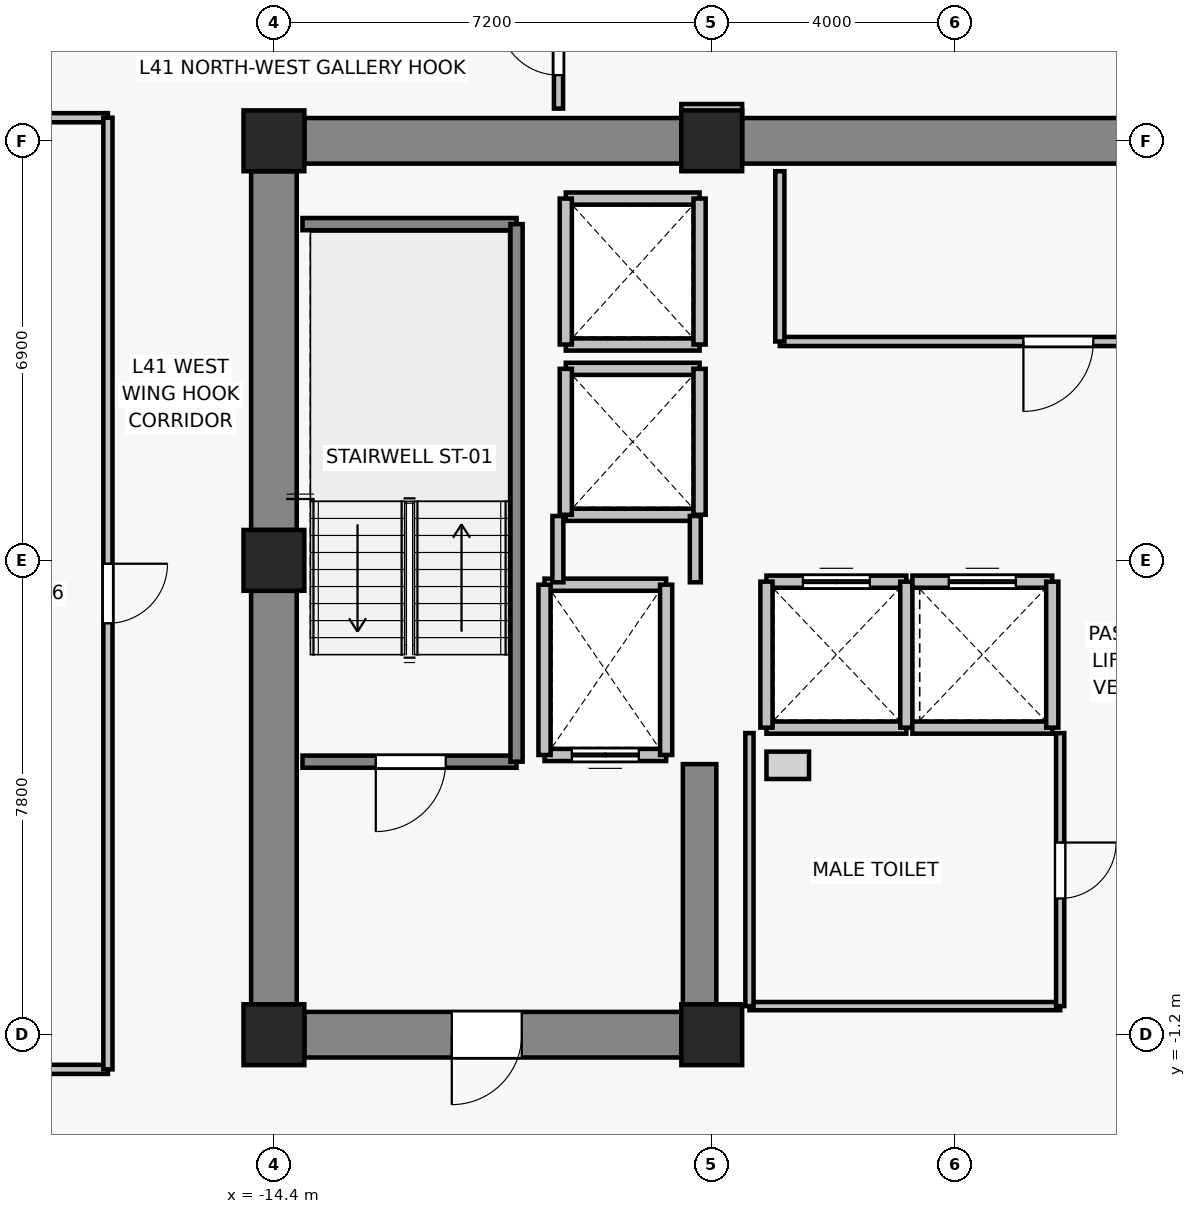
"""IFC4 building model, lengths in metres.
Left out: names, types, materials, properties, quantities, classifications, styles, units other than length and angle.
Written with IfcOpenShell. Run it as: python <this file> out.ifc"""

import sys

from ifc_helpers import new_model, si_unit, direction, frame, frame_2d, origin, origin_2d, place, context, subcontext, project, spatial, rectangle, extrude, source, transform, mapped, element, fill, save


model = new_model("IFC4")
c1 = context("Model", 3, precision=1e-05, world=origin(), true_north=direction((0.0, 1.0)))
c2 = subcontext(c1, "Body", "Model", "MODEL_VIEW")
j1 = project(units=[si_unit("LENGTHUNIT", "METRE"), si_unit("PLANEANGLEUNIT", "RADIAN")], contexts=[c1])
p1 = place(None, origin())
s1 = spatial("IfcSite", under=j1, at=p1, CompositionType="ELEMENT")
p2 = place(p1, origin())
s2 = spatial("IfcBuilding", under=s1, at=p2, CompositionType="ELEMENT")
p3 = place(p2, frame((0.0, 0.0, 149.5)))
s3 = spatial("IfcBuildingStorey", under=s2, at=p3, CompositionType="ELEMENT", Elevation=149.5)
for number, where, z_axis, x_axis in (
    (1, (-14.4, -1.2, 0.0), (0.0, 0.0, 1.0), (1.0, 0.0, 0.0)),
    (2, (-7.2, -1.2, 0.0), (0.0, 0.0, 1.0), (1.0, 0.0, 0.0)),
    (3, (-14.4, 6.6, 0.0), (0.0, 0.0, 1.0), (1.0, 0.0, 0.0)),
    (4, (-14.4, 13.5, 0.0), (0.0, 0.0, 1.0), (1.0, 0.0, 0.0)),
    (5, (-7.2, 13.5, 0.0), (0.0, 0.0, 1.0), (1.0, 0.0, 0.0)),
):
    element("IfcColumn", number, at=place(p3, frame(where, z_axis=z_axis, x_axis=x_axis)), inside=s3, PredefinedType="COLUMN", context=c2, shape_type="SweptSolid", body=[
        extrude(rectangle(XDim=1.0, YDim=1.0, at=origin_2d()), origin(), (0.0, 0.0, 1.0), 3.3),
    ])
p4 = place(p3, frame((-13.9, 13.5, 0.0), z_axis=(0.0, 0.0, 1.0), x_axis=(1.0, 0.0, 0.0)))
e6 = element("IfcWall", 6, at=p4, inside=s3, PredefinedType="SHEAR", context=c2, shape_type="SweptSolid", body=[
    extrude(rectangle(XDim=6.2, YDim=0.75, at=frame_2d((3.1, 0.0))), origin(), (0.0, 0.0, 1.0), 3.075),
])
p5 = place(p3, frame((-6.7, 13.5, 0.0), z_axis=(0.0, 0.0, 1.0), x_axis=(1.0, 0.0, 0.0)))
e7 = element("IfcWall", 7, at=p5, inside=s3, PredefinedType="SHEAR", context=c2, shape_type="SweptSolid", body=[
    extrude(rectangle(XDim=13.4, YDim=0.75, at=frame_2d((6.7, 0.0))), origin(), (0.0, 0.0, 1.0), 3.075),
])
p6 = place(p3, frame((-14.4, -0.7, 0.0), z_axis=(0.0, 0.0, 1.0), x_axis=(0.0, 1.0, 0.0)))
e8 = element("IfcWall", 8, at=p6, inside=s3, PredefinedType="SHEAR", context=c2, shape_type="SweptSolid", body=[
    extrude(rectangle(XDim=6.8, YDim=0.75, at=frame_2d((3.4, 0.0))), origin(), (0.0, 0.0, 1.0), 3.075),
])
p7 = place(p3, frame((-14.4, 7.1, 0.0), z_axis=(0.0, 0.0, 1.0), x_axis=(0.0, 1.0, 0.0)))
e9 = element("IfcWall", 9, at=p7, inside=s3, PredefinedType="SHEAR", context=c2, shape_type="SweptSolid", body=[
    extrude(rectangle(XDim=5.9, YDim=0.75, at=frame_2d((2.95, 0.0))), origin(), (0.0, 0.0, 1.0), 3.075),
])
p8 = place(p3, frame((-7.7, -1.2, 0.0), z_axis=(0.0, 0.0, 1.0), x_axis=(-1.0, 0.0, 0.0)))
e10 = element("IfcWall", 10, at=p8, inside=s3, PredefinedType="SHEAR", context=c2, shape_type="SweptSolid", body=[
    extrude(rectangle(XDim=6.2, YDim=0.75, at=frame_2d((3.1, 0.0))), origin(), (0.0, 0.0, 1.0), 3.075),
])
p9 = place(p8, frame((2.625, 0.0, 0.0)))
e11 = element("IfcOpeningElement", 11, at=p9, cuts=e10, PredefinedType="OPENING", context=c2, shape_type="SweptSolid", body=[
    extrude(rectangle(XDim=1.15, YDim=2.15, at=frame_2d((0.575, 1.075))), frame((0.0, 0.385, 0.0), z_axis=(0.0, -1.0, 0.0), x_axis=(1.0, 0.0, 0.0)), (0.0, 0.0, 1.0), 0.77),
])
p10 = place(p3, frame((-7.4, -0.825, 0.0), z_axis=(0.0, 0.0, 1.0), x_axis=(0.0, 1.0, 0.0)))
e12 = element("IfcWall", 12, at=p10, inside=s3, PredefinedType="SHEAR", context=c2, shape_type="SweptSolid", body=[
    extrude(rectangle(XDim=4.075, YDim=0.55, at=frame_2d((2.038, 0.0))), origin(), (0.0, 0.0, 1.0), 3.075),
])
p11 = place(p3, frame((-7.95, 3.4, 0.0), z_axis=(0.0, 0.0, 1.0), x_axis=(-1.0, 0.0, 0.0)))
e13 = element("IfcWall", 13, at=p11, inside=s3, PredefinedType="SOLIDWALL", context=c2, shape_type="SweptSolid", body=[
    extrude(rectangle(XDim=2.0, YDim=0.2, at=frame_2d((1.0, 0.0))), origin(), (0.0, 0.0, 1.0), 3.075),
])
p12 = place(p11, frame((0.45, 0.0, 0.0)))
e14 = element("IfcOpeningElement", 14, at=p12, cuts=e13, PredefinedType="OPENING", context=c2, shape_type="SweptSolid", body=[
    extrude(rectangle(XDim=1.1, YDim=2.2, at=frame_2d((0.55, 1.1))), frame((0.0, 0.11, 0.0), z_axis=(0.0, -1.0, 0.0), x_axis=(1.0, 0.0, 0.0)), (0.0, 0.0, 1.0), 0.22),
])
p13 = place(p3, frame((-9.95, 6.2, 0.0), z_axis=(0.0, 0.0, 1.0), x_axis=(1.0, 0.0, 0.0)))
e15 = element("IfcWall", 15, at=p13, inside=s3, PredefinedType="SOLIDWALL", context=c2, shape_type="SweptSolid", body=[
    extrude(rectangle(XDim=2.0, YDim=0.2, at=frame_2d((1.0, 0.0))), origin(), (0.0, 0.0, 1.0), 3.075),
])
for number, where, z_axis, x_axis in (
    (16, (-9.95, 3.4, 0.0), (0.0, 0.0, 1.0), (0.0, 1.0, 0.0)),
    (17, (-7.95, 6.2, 0.0), (0.0, 0.0, 1.0), (0.0, -1.0, 0.0)),
):
    element("IfcWall", number, at=place(p3, frame(where, z_axis=z_axis, x_axis=x_axis)), inside=s3, PredefinedType="SOLIDWALL", context=c2, shape_type="SweptSolid", body=[
        extrude(rectangle(XDim=2.8, YDim=0.2, at=frame_2d((1.4, 0.0))), origin(), (0.0, 0.0, 1.0), 3.075),
    ])
p14 = place(p3, frame((-4.0, 3.85, 0.0), z_axis=(0.0, 0.0, 1.0), x_axis=(-1.0, 0.0, 0.0)))
e18 = element("IfcWall", 18, at=p14, inside=s3, PredefinedType="SOLIDWALL", context=c2, shape_type="SweptSolid", body=[
    extrude(rectangle(XDim=2.3, YDim=0.2, at=frame_2d((1.15, 0.0))), origin(), (0.0, 0.0, 1.0), 3.075),
])
p15 = place(p3, frame((-6.3, 6.25, 0.0), z_axis=(0.0, 0.0, 1.0), x_axis=(1.0, 0.0, 0.0)))
e19 = element("IfcWall", 19, at=p15, inside=s3, PredefinedType="SOLIDWALL", context=c2, shape_type="SweptSolid", body=[
    extrude(rectangle(XDim=2.3, YDim=0.2, at=frame_2d((1.15, 0.0))), origin(), (0.0, 0.0, 1.0), 3.075),
])
p16 = place(p15, frame((0.6, 0.0, 0.0)))
e20 = element("IfcOpeningElement", 20, at=p16, cuts=e19, PredefinedType="OPENING", context=c2, shape_type="SweptSolid", body=[
    extrude(rectangle(XDim=1.1, YDim=2.2, at=frame_2d((0.55, 1.1))), frame((0.0, 0.11, 0.0), z_axis=(0.0, -1.0, 0.0), x_axis=(1.0, 0.0, 0.0)), (0.0, 0.0, 1.0), 0.22),
])
for number, where, z_axis, x_axis in (
    (21, (-6.3, 3.85, 0.0), (0.0, 0.0, 1.0), (0.0, 1.0, 0.0)),
    (22, (-4.0, 6.25, 0.0), (0.0, 0.0, 1.0), (0.0, -1.0, 0.0)),
):
    element("IfcWall", number, at=place(p3, frame(where, z_axis=z_axis, x_axis=x_axis)), inside=s3, PredefinedType="SOLIDWALL", context=c2, shape_type="SweptSolid", body=[
        extrude(rectangle(XDim=2.4, YDim=0.2, at=frame_2d((1.2, 0.0))), origin(), (0.0, 0.0, 1.0), 3.075),
    ])
p17 = place(p3, frame((-1.6, 3.85, 0.0), z_axis=(0.0, 0.0, 1.0), x_axis=(-1.0, 0.0, 0.0)))
e23 = element("IfcWall", 23, at=p17, inside=s3, PredefinedType="SOLIDWALL", context=c2, shape_type="SweptSolid", body=[
    extrude(rectangle(XDim=2.3, YDim=0.2, at=frame_2d((1.15, 0.0))), origin(), (0.0, 0.0, 1.0), 3.075),
])
p18 = place(p3, frame((-3.9, 6.25, 0.0), z_axis=(0.0, 0.0, 1.0), x_axis=(1.0, 0.0, 0.0)))
e24 = element("IfcWall", 24, at=p18, inside=s3, PredefinedType="SOLIDWALL", context=c2, shape_type="SweptSolid", body=[
    extrude(rectangle(XDim=2.3, YDim=0.2, at=frame_2d((1.15, 0.0))), origin(), (0.0, 0.0, 1.0), 3.075),
])
p19 = place(p18, frame((0.6, 0.0, 0.0)))
e25 = element("IfcOpeningElement", 25, at=p19, cuts=e24, PredefinedType="OPENING", context=c2, shape_type="SweptSolid", body=[
    extrude(rectangle(XDim=1.1, YDim=2.2, at=frame_2d((0.55, 1.1))), frame((0.0, 0.11, 0.0), z_axis=(0.0, -1.0, 0.0), x_axis=(1.0, 0.0, 0.0)), (0.0, 0.0, 1.0), 0.22),
])
p20 = place(p3, frame((-1.6, 6.25, 0.0), z_axis=(0.0, 0.0, 1.0), x_axis=(0.0, -1.0, 0.0)))
e26 = element("IfcWall", 26, at=p20, inside=s3, PredefinedType="SOLIDWALL", context=c2, shape_type="SweptSolid", body=[
    extrude(rectangle(XDim=2.4, YDim=0.2, at=frame_2d((1.2, 0.0))), origin(), (0.0, 0.0, 1.0), 3.075),
])
for number, where, z_axis, x_axis in (
    (27, (-7.4, 7.35, 0.0), (0.0, 0.0, 1.0), (-1.0, 0.0, 0.0)),
    (28, (-9.6, 9.75, 0.0), (0.0, 0.0, 1.0), (1.0, 0.0, 0.0)),
):
    element("IfcWall", number, at=place(p3, frame(where, z_axis=z_axis, x_axis=x_axis)), inside=s3, PredefinedType="SOLIDWALL", context=c2, shape_type="SweptSolid", body=[
        extrude(rectangle(XDim=2.2, YDim=0.2, at=frame_2d((1.1, 0.0))), origin(), (0.0, 0.0, 1.0), 2.565),
    ])
p21 = place(p3, frame((-9.6, 7.35, 0.0), z_axis=(0.0, 0.0, 1.0), x_axis=(0.0, 1.0, 0.0)))
e29 = element("IfcWall", 29, at=p21, inside=s3, PredefinedType="SOLIDWALL", context=c2, shape_type="SweptSolid", body=[
    extrude(rectangle(XDim=2.4, YDim=0.2, at=frame_2d((1.2, 0.0))), origin(), (0.0, 0.0, 1.0), 3.075),
])
p22 = place(p3, frame((-7.4, 9.75, 0.0), z_axis=(0.0, 0.0, 1.0), x_axis=(0.0, -1.0, 0.0)))
e30 = element("IfcWall", 30, at=p22, inside=s3, PredefinedType="SOLIDWALL", context=c2, shape_type="SweptSolid", body=[
    extrude(rectangle(XDim=2.4, YDim=0.2, at=frame_2d((1.2, 0.0))), origin(), (0.0, 0.0, 1.0), 2.565),
])
for number, where, z_axis, x_axis in (
    (31, (-7.4, 10.15, 0.0), (0.0, 0.0, 1.0), (-1.0, 0.0, 0.0)),
    (32, (-9.6, 12.55, 0.0), (0.0, 0.0, 1.0), (1.0, 0.0, 0.0)),
):
    element("IfcWall", number, at=place(p3, frame(where, z_axis=z_axis, x_axis=x_axis)), inside=s3, PredefinedType="SOLIDWALL", context=c2, shape_type="SweptSolid", body=[
        extrude(rectangle(XDim=2.2, YDim=0.2, at=frame_2d((1.1, 0.0))), origin(), (0.0, 0.0, 1.0), 2.565),
    ])
p23 = place(p3, frame((-9.6, 10.15, 0.0), z_axis=(0.0, 0.0, 1.0), x_axis=(0.0, 1.0, 0.0)))
e33 = element("IfcWall", 33, at=p23, inside=s3, PredefinedType="SOLIDWALL", context=c2, shape_type="SweptSolid", body=[
    extrude(rectangle(XDim=2.4, YDim=0.2, at=frame_2d((1.2, 0.0))), origin(), (0.0, 0.0, 1.0), 3.075),
])
p24 = place(p3, frame((-7.4, 12.55, 0.0), z_axis=(0.0, 0.0, 1.0), x_axis=(0.0, -1.0, 0.0)))
e34 = element("IfcWall", 34, at=p24, inside=s3, PredefinedType="SOLIDWALL", context=c2, shape_type="SweptSolid", body=[
    extrude(rectangle(XDim=2.4, YDim=0.2, at=frame_2d((1.2, 0.0))), origin(), (0.0, 0.0, 1.0), 2.565),
])
p25 = place(p3, frame((-10.41, 3.29, 0.0), z_axis=(0.0, 0.0, 1.0), x_axis=(-1.0, 0.0, 0.0)))
e35 = element("IfcWall", 35, at=p25, inside=s3, PredefinedType="SOLIDWALL", context=c2, shape_type="SweptSolid", body=[
    extrude(rectangle(XDim=3.52, YDim=0.2, at=frame_2d((1.76, 0.0))), origin(), (0.0, 0.0, 1.0), 3.075),
])
p26 = place(p25, frame((1.165, 0.0, 0.0)))
e36 = element("IfcOpeningElement", 36, at=p26, cuts=e35, PredefinedType="OPENING", context=c2, shape_type="SweptSolid", body=[
    extrude(rectangle(XDim=1.15, YDim=2.15, at=frame_2d((0.575, 1.075))), frame((0.0, 0.11, 0.0), z_axis=(0.0, -1.0, 0.0), x_axis=(1.0, 0.0, 0.0)), (0.0, 0.0, 1.0), 0.22),
])
p27 = place(p3, frame((-13.93, 12.13, 0.0), z_axis=(0.0, 0.0, 1.0), x_axis=(1.0, 0.0, 0.0)))
e37 = element("IfcWall", 37, at=p27, inside=s3, PredefinedType="SOLIDWALL", context=c2, shape_type="SweptSolid", body=[
    extrude(rectangle(XDim=3.52, YDim=0.2, at=frame_2d((1.76, 0.0))), origin(), (0.0, 0.0, 1.0), 3.075),
])
p28 = place(p3, frame((-10.41, 12.13, 0.0), z_axis=(0.0, 0.0, 1.0), x_axis=(0.0, -1.0, 0.0)))
e38 = element("IfcWall", 38, at=p28, inside=s3, PredefinedType="SOLIDWALL", context=c2, shape_type="SweptSolid", body=[
    extrude(rectangle(XDim=8.84, YDim=0.2, at=frame_2d((4.42, 0.0))), origin(), (0.0, 0.0, 1.0), 3.075),
])
p29 = place(p3, frame((-9.73, 6.24, 0.0), z_axis=(0.0, 0.0, 1.0), x_axis=(0.0, 1.0, 0.0)))
e39 = element("IfcWall", 39, at=p29, inside=s3, PredefinedType="PARTITIONING", context=c2, shape_type="SweptSolid", body=[
    extrude(rectangle(XDim=1.09, YDim=0.18, at=frame_2d((0.545, 0.0))), origin(), (0.0, 0.0, 1.0), 3.075),
])
p30 = place(p3, frame((-7.47, 7.33, 0.0), z_axis=(0.0, 0.0, 1.0), x_axis=(0.0, -1.0, 0.0)))
e40 = element("IfcWall", 40, at=p30, inside=s3, PredefinedType="PARTITIONING", context=c2, shape_type="SweptSolid", body=[
    extrude(rectangle(XDim=1.09, YDim=0.18, at=frame_2d((0.545, 0.0))), origin(), (0.0, 0.0, 1.0), 2.565),
])
p31 = place(p3, frame((6.08, 10.2, 0.0), z_axis=(0.0, 0.0, 1.0), x_axis=(-1.0, 0.0, 0.0)))
e41 = element("IfcWall", 41, at=p31, inside=s3, PredefinedType="PARTITIONING", context=c2, shape_type="SweptSolid", body=[
    extrude(rectangle(XDim=12.16, YDim=0.15, at=frame_2d((6.08, 0.0))), origin(), (0.0, 0.0, 1.0), 3.075),
])
p32 = place(p31, frame((7.005, 0.0, 0.0)))
e42 = element("IfcOpeningElement", 42, at=p32, cuts=e41, PredefinedType="OPENING", context=c2, shape_type="SweptSolid", body=[
    extrude(rectangle(XDim=1.15, YDim=2.15, at=frame_2d((0.575, 1.075))), frame((0.0, 0.085, 0.0), z_axis=(0.0, -1.0, 0.0), x_axis=(1.0, 0.0, 0.0)), (0.0, 0.0, 1.0), 0.17),
])
p33 = place(p3, frame((-6.08, 10.2, 0.0), z_axis=(0.0, 0.0, 1.0), x_axis=(0.0, 1.0, 0.0)))
e43 = element("IfcWall", 43, at=p33, inside=s3, PredefinedType="PARTITIONING", context=c2, shape_type="SweptSolid", body=[
    extrude(rectangle(XDim=2.8, YDim=0.15, at=frame_2d((1.4, 0.0))), origin(), (0.0, 0.0, 1.0), 3.075),
])
p34 = place(p3, frame((-1.47, -0.73, 0.0), z_axis=(0.0, 0.0, 1.0), x_axis=(-1.0, 0.0, 0.0)))
e44 = element("IfcWall", 44, at=p34, inside=s3, PredefinedType="PARTITIONING", context=c2, shape_type="SweptSolid", body=[
    extrude(rectangle(XDim=5.11, YDim=0.135, at=frame_2d((2.555, 0.0))), origin(), (0.0, 0.0, 1.0), 3.075),
])
p35 = place(p3, frame((-6.58, -0.73, 0.0), z_axis=(0.0, 0.0, 1.0), x_axis=(0.0, 1.0, 0.0)))
e45 = element("IfcWall", 45, at=p35, inside=s3, PredefinedType="PARTITIONING", context=c2, shape_type="SweptSolid", body=[
    extrude(rectangle(XDim=4.49, YDim=0.135, at=frame_2d((2.245, 0.0))), origin(), (0.0, 0.0, 1.0), 3.075),
])
p36 = place(p3, frame((-1.47, 3.76, 0.0), z_axis=(0.0, 0.0, 1.0), x_axis=(0.0, -1.0, 0.0)))
e46 = element("IfcWall", 46, at=p36, inside=s3, PredefinedType="PARTITIONING", context=c2, shape_type="SweptSolid", body=[
    extrude(rectangle(XDim=4.49, YDim=0.135, at=frame_2d((2.245, 0.0))), origin(), (0.0, 0.0, 1.0), 3.075),
])
p37 = place(p36, frame((1.8, 0.0, 0.0)))
e47 = element("IfcOpeningElement", 47, at=p37, cuts=e46, PredefinedType="OPENING", context=c2, shape_type="SweptSolid", body=[
    extrude(rectangle(XDim=0.92, YDim=2.1, at=frame_2d((0.46, 1.05))), frame((0.0, 0.077, 0.0), z_axis=(0.0, -1.0, 0.0), x_axis=(1.0, 0.0, 0.0)), (0.0, 0.0, 1.0), 0.155),
])
p38 = place(p3, frame((-17.13, -1.77, 0.0), z_axis=(0.0, 0.0, 1.0), x_axis=(-1.0, 0.0, 0.0)))
e48 = element("IfcWall", 48, at=p38, inside=s3, PredefinedType="PARTITIONING", context=c2, shape_type="SweptSolid", body=[
    extrude(rectangle(XDim=9.4, YDim=0.15, at=frame_2d((4.7, 0.0))), origin(), (0.0, 0.0, 1.0), 2.565),
])
p39 = place(p3, frame((-26.53, 13.88, 0.0), z_axis=(0.0, 0.0, 1.0), x_axis=(1.0, 0.0, 0.0)))
e49 = element("IfcWall", 49, at=p39, inside=s3, PredefinedType="PARTITIONING", context=c2, shape_type="SweptSolid", body=[
    extrude(rectangle(XDim=9.4, YDim=0.15, at=frame_2d((4.7, 0.0))), origin(), (0.0, 0.0, 1.0), 3.075),
])
p40 = place(p3, frame((-17.13, 13.88, 0.0), z_axis=(0.0, 0.0, 1.0), x_axis=(0.0, -1.0, 0.0)))
e50 = element("IfcWall", 50, at=p40, inside=s3, PredefinedType="PARTITIONING", context=c2, shape_type="SweptSolid", body=[
    extrude(rectangle(XDim=15.65, YDim=0.15, at=frame_2d((7.825, 0.0))), origin(), (0.0, 0.0, 1.0), 2.565),
])
p41 = place(p40, frame((7.335, 0.0, 0.0)))
e51 = element("IfcOpeningElement", 51, at=p41, cuts=e50, PredefinedType="OPENING", context=c2, shape_type="SweptSolid", body=[
    extrude(rectangle(XDim=0.98, YDim=2.15, at=frame_2d((0.49, 1.075))), frame((0.0, 0.085, 0.0), z_axis=(0.0, -1.0, 0.0), x_axis=(1.0, 0.0, 0.0)), (0.0, 0.0, 1.0), 0.17),
])
p42 = place(p3, frame((-6.7, 14.03, 0.0), z_axis=(0.0, 0.0, 1.0), x_axis=(-1.0, 0.0, 0.0)))
e52 = element("IfcWall", 52, at=p42, inside=s3, PredefinedType="PARTITIONING", context=c2, shape_type="SweptSolid", body=[
    extrude(rectangle(XDim=1.0, YDim=0.15, at=frame_2d((0.5, 0.0))), origin(), (0.0, 0.0, 1.0), 2.565),
])
p43 = place(p3, frame((-9.72, 14.03, 0.0), z_axis=(0.0, 0.0, 1.0), x_axis=(0.0, 1.0, 0.0)))
e53 = element("IfcWall", 53, at=p43, inside=s3, PredefinedType="PARTITIONING", context=c2, shape_type="SweptSolid", body=[
    extrude(rectangle(XDim=3.3, YDim=0.15, at=frame_2d((1.65, 0.0))), origin(), (0.0, 0.0, 1.0), 2.565),
])
p44 = place(p43, frame((0.55, 0.0, 0.0)))
e54 = element("IfcOpeningElement", 54, at=p44, cuts=e53, PredefinedType="OPENING", context=c2, shape_type="SweptSolid", body=[
    extrude(rectangle(XDim=0.98, YDim=2.15, at=frame_2d((0.49, 1.075))), frame((0.0, 0.085, 0.0), z_axis=(0.0, -1.0, 0.0), x_axis=(1.0, 0.0, 0.0)), (0.0, 0.0, 1.0), 0.17),
])
m1 = source(origin(), c2, "Body", "SweptSolid", [
    extrude(rectangle(XDim=1.1, YDim=2.2, at=frame_2d((0.55, 1.1))), frame((0.0, 0.025, 0.0), z_axis=(0.0, -1.0, 0.0), x_axis=(1.0, 0.0, 0.0)), (0.0, 0.0, 1.0), 0.05),
])
p45 = place(p12, origin())
e55 = element("IfcDoor", 55, at=p45, inside=s3, OperationType="DOUBLE_DOOR_SLIDING", PredefinedType="DOOR", context=c2, shape_type="MappedRepresentation", body=[
    mapped(m1, transform((0.0, 0.0, 0.0), x_axis=(1.0, 0.0, 0.0), y_axis=(0.0, 1.0, 0.0), z_axis=(0.0, 0.0, 1.0), scale=1.0)),
])
fill(e14, e55)
p46 = place(p16, origin())
e56 = element("IfcDoor", 56, at=p46, inside=s3, OperationType="DOUBLE_DOOR_SLIDING", PredefinedType="DOOR", context=c2, shape_type="MappedRepresentation", body=[
    mapped(m1, transform((0.0, 0.0, 0.0), x_axis=(1.0, 0.0, 0.0), y_axis=(0.0, 1.0, 0.0), z_axis=(0.0, 0.0, 1.0), scale=1.0)),
])
fill(e20, e56)
p47 = place(p19, origin())
e57 = element("IfcDoor", 57, at=p47, inside=s3, OperationType="DOUBLE_DOOR_SLIDING", PredefinedType="DOOR", context=c2, shape_type="MappedRepresentation", body=[
    mapped(m1, transform((0.0, 0.0, 0.0), x_axis=(1.0, 0.0, 0.0), y_axis=(0.0, 1.0, 0.0), z_axis=(0.0, 0.0, 1.0), scale=1.0)),
])
fill(e25, e57)
m2 = source(origin(), c2, "Body", "SweptSolid", [
    extrude(rectangle(XDim=1.15, YDim=2.15, at=frame_2d((0.575, 1.075))), frame((0.0, 0.025, 0.0), z_axis=(0.0, -1.0, 0.0), x_axis=(1.0, 0.0, 0.0)), (0.0, 0.0, 1.0), 0.05),
])
p48 = place(p26, origin())
e58 = element("IfcDoor", 58, at=p48, inside=s3, OperationType="SINGLE_SWING_RIGHT", PredefinedType="DOOR", context=c2, shape_type="MappedRepresentation", body=[
    mapped(m2, transform((0.0, 0.0, 0.0), x_axis=(1.0, 0.0, 0.0), y_axis=(0.0, 1.0, 0.0), z_axis=(0.0, 0.0, 1.0), scale=1.0)),
])
fill(e36, e58)
p49 = place(p9, origin())
e59 = element("IfcDoor", 59, at=p49, inside=s3, OperationType="SINGLE_SWING_RIGHT", PredefinedType="DOOR", context=c2, shape_type="MappedRepresentation", body=[
    mapped(m2, transform((0.0, 0.0, 0.0), x_axis=(1.0, 0.0, 0.0), y_axis=(0.0, 1.0, 0.0), z_axis=(0.0, 0.0, 1.0), scale=1.0)),
])
fill(e11, e59)
p50 = place(p32, origin())
e60 = element("IfcDoor", 60, at=p50, inside=s3, OperationType="SINGLE_SWING_RIGHT", PredefinedType="DOOR", context=c2, shape_type="MappedRepresentation", body=[
    mapped(m2, transform((0.0, 0.0, 0.0), x_axis=(1.0, 0.0, 0.0), y_axis=(0.0, 1.0, 0.0), z_axis=(0.0, 0.0, 1.0), scale=1.0)),
])
fill(e42, e60)
m3 = source(origin(), c2, "Body", "SweptSolid", [
    extrude(rectangle(XDim=0.92, YDim=2.1, at=frame_2d((0.46, 1.05))), frame((0.0, 0.025, 0.0), z_axis=(0.0, -1.0, 0.0), x_axis=(1.0, 0.0, 0.0)), (0.0, 0.0, 1.0), 0.05),
])
p51 = place(p37, origin())
e61 = element("IfcDoor", 61, at=p51, inside=s3, OperationType="SINGLE_SWING_LEFT", PredefinedType="DOOR", context=c2, shape_type="MappedRepresentation", body=[
    mapped(m3, transform((0.0, 0.0, 0.0), x_axis=(1.0, 0.0, 0.0), y_axis=(0.0, 1.0, 0.0), z_axis=(0.0, 0.0, 1.0), scale=1.0)),
])
fill(e47, e61)
m4 = source(origin(), c2, "Body", "SweptSolid", [
    extrude(rectangle(XDim=0.98, YDim=2.15, at=frame_2d((0.49, 1.075))), frame((0.0, 0.025, 0.0), z_axis=(0.0, -1.0, 0.0), x_axis=(1.0, 0.0, 0.0)), (0.0, 0.0, 1.0), 0.05),
])
p52 = place(p41, origin())
e62 = element("IfcDoor", 62, at=p52, inside=s3, OperationType="SINGLE_SWING_LEFT", PredefinedType="DOOR", context=c2, shape_type="MappedRepresentation", body=[
    mapped(m4, transform((0.0, 0.0, 0.0), x_axis=(1.0, 0.0, 0.0), y_axis=(0.0, 1.0, 0.0), z_axis=(0.0, 0.0, 1.0), scale=1.0)),
])
fill(e51, e62)
p53 = place(p44, origin())
e63 = element("IfcDoor", 63, at=p53, inside=s3, OperationType="SINGLE_SWING_RIGHT", PredefinedType="DOOR", context=c2, shape_type="MappedRepresentation", body=[
    mapped(m4, transform((0.0, 0.0, 0.0), x_axis=(1.0, 0.0, 0.0), y_axis=(0.0, 1.0, 0.0), z_axis=(0.0, 0.0, 1.0), scale=1.0)),
])
fill(e54, e63)
save(model, sys.argv[1])
